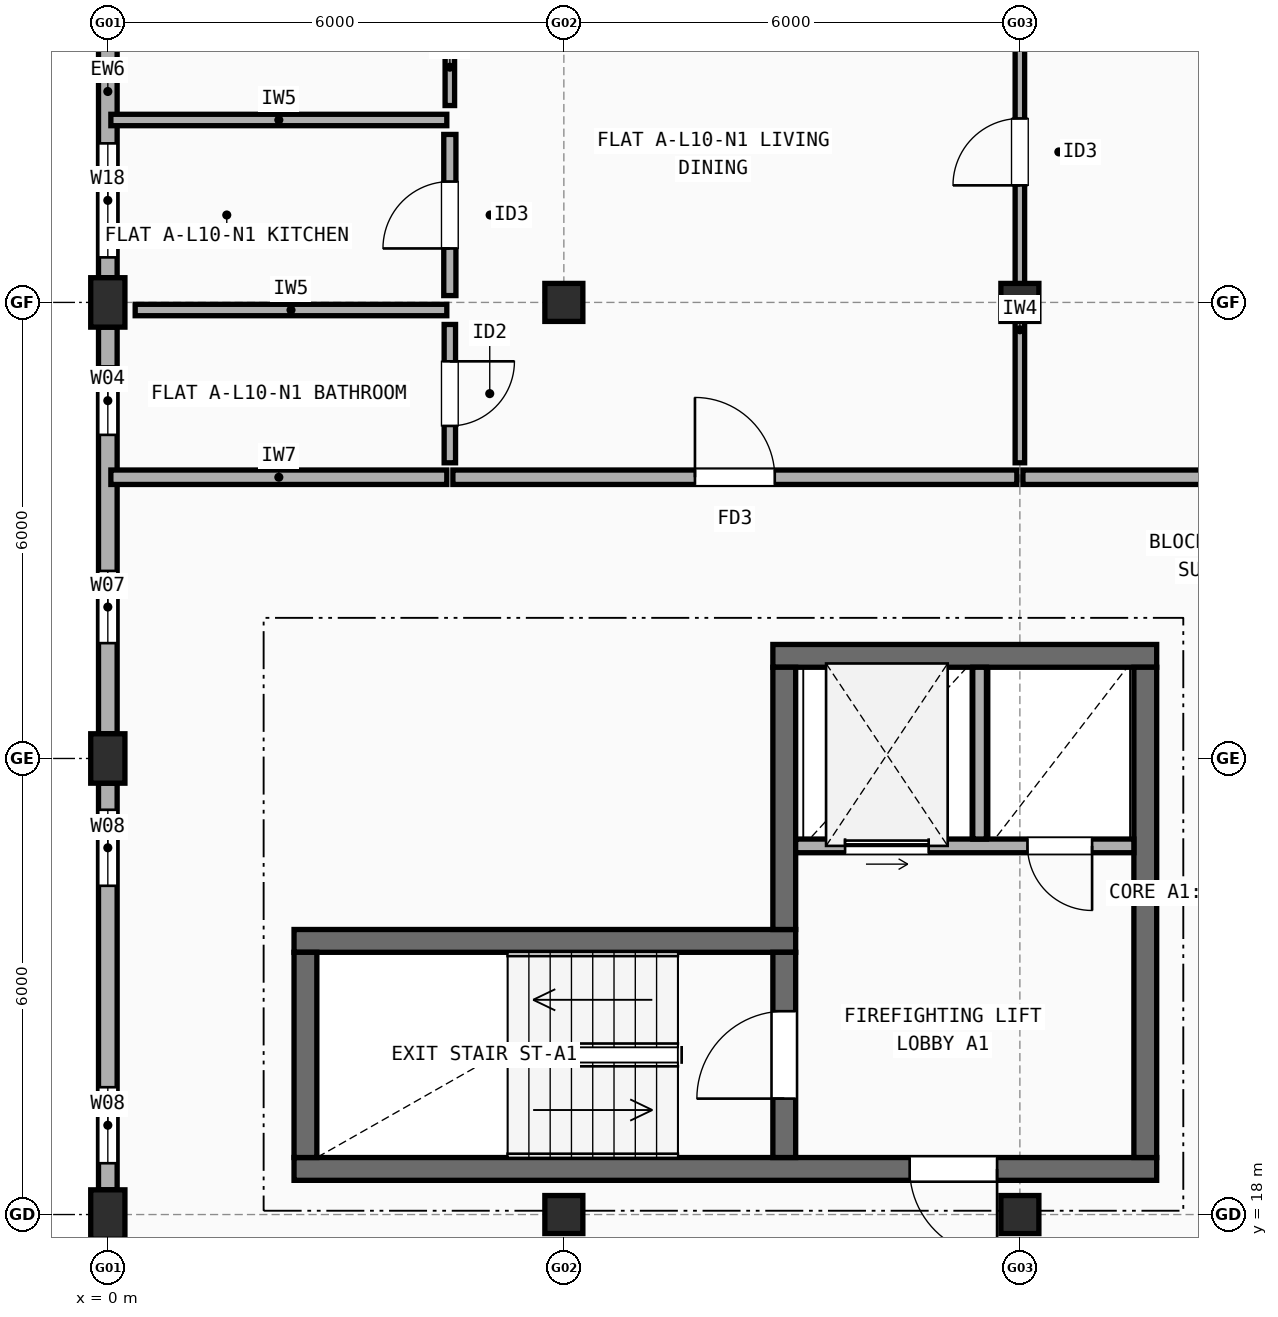
"""IFC4 building model, lengths in metres.
Left out: names, types, materials, properties, quantities, classifications, styles, units other than length and angle.
Written with IfcOpenShell. Run it as: python <this file> out.ifc"""

import sys

from ifc_helpers import new_model, si_unit, direction, frame, frame_2d, origin, origin_2d, place, context, subcontext, project, spatial, rectangle, extrude, element, fill, save


model = new_model("IFC4")
c1 = context("Model", 3, precision=1e-05, world=origin(), true_north=direction((0.0, 1.0)))
c2 = subcontext(c1, "Body", "Model", "MODEL_VIEW")
j1 = project(units=[si_unit("LENGTHUNIT", "METRE"), si_unit("PLANEANGLEUNIT", "RADIAN")], contexts=[c1])
p1 = place(None, origin())
s1 = spatial("IfcSite", under=j1, at=p1, CompositionType="ELEMENT")
p2 = place(p1, origin())
s2 = spatial("IfcBuilding", under=s1, at=p2, CompositionType="ELEMENT")
p3 = place(p2, frame((0.0, 0.0, 33.3)))
s3 = spatial("IfcBuildingStorey", under=s2, at=p3, CompositionType="ELEMENT", Elevation=33.3)
for number, where, z_axis, x_axis in (
    (1, (0.0, 18.0, 0.0), (0.0, 0.0, 1.0), (1.0, 0.0, 0.0)),
    (2, (0.0, 24.0, 0.0), (0.0, 0.0, 1.0), (1.0, 0.0, 0.0)),
    (3, (0.0, 30.0, 0.0), (0.0, 0.0, 1.0), (1.0, 0.0, 0.0)),
):
    element("IfcColumn", number, at=place(p3, frame(where, z_axis=z_axis, x_axis=x_axis)), inside=s3, PredefinedType="COLUMN", context=c2, shape_type="SweptSolid", body=[
        extrude(rectangle(XDim=0.45, YDim=0.65, at=origin_2d()), origin(), (0.0, 0.0, 1.0), 2.99),
    ])
for number, where, z_axis, x_axis in (
    (4, (6.0, 18.0, 0.0), (0.0, 0.0, 1.0), (1.0, 0.0, 0.0)),
    (5, (6.0, 30.0, 0.0), (0.0, 0.0, 1.0), (1.0, 0.0, 0.0)),
    (6, (12.0, 18.0, 0.0), (0.0, 0.0, 1.0), (1.0, 0.0, 0.0)),
    (7, (12.0, 30.0, 0.0), (0.0, 0.0, 1.0), (1.0, 0.0, 0.0)),
):
    element("IfcColumn", number, at=place(p3, frame(where, z_axis=z_axis, x_axis=x_axis)), inside=s3, PredefinedType="COLUMN", context=c2, shape_type="SweptSolid", body=[
        extrude(rectangle(XDim=0.5, YDim=0.5, at=origin_2d()), origin(), (0.0, 0.0, 1.0), 2.99),
    ])
p4 = place(p3, frame((0.0, 35.675, 0.0), z_axis=(0.0, 0.0, 1.0), x_axis=(0.0, -1.0, 0.0)))
e8 = element("IfcWall", 8, at=p4, inside=s3, PredefinedType="STANDARD", context=c2, shape_type="SweptSolid", body=[
    extrude(rectangle(XDim=5.35, YDim=0.245, at=frame_2d((2.675, 0.0))), origin(), (0.0, 0.0, 1.0), 2.472),
])
p5 = place(p4, frame((1.018, 0.0, 0.9)))
e9 = element("IfcOpeningElement", 9, at=p5, cuts=e8, PredefinedType="OPENING", context=c2, shape_type="SweptSolid", body=[
    extrude(rectangle(XDim=1.2, YDim=1.35, at=frame_2d((0.6, 0.675))), frame((0.0, 0.133, 0.0), z_axis=(0.0, -1.0, 0.0), x_axis=(1.0, 0.0, 0.0)), (0.0, 0.0, 1.0), 0.265),
])
p6 = place(p4, frame((3.583, 0.0, 0.9)))
e10 = element("IfcOpeningElement", 10, at=p6, cuts=e8, PredefinedType="OPENING", context=c2, shape_type="SweptSolid", body=[
    extrude(rectangle(XDim=1.5, YDim=1.4, at=frame_2d((0.75, 0.7))), frame((0.0, 0.133, 0.0), z_axis=(0.0, -1.0, 0.0), x_axis=(1.0, 0.0, 0.0)), (0.0, 0.0, 1.0), 0.265),
])
p7 = place(p3, frame((0.0, 29.675, 0.0), z_axis=(0.0, 0.0, 1.0), x_axis=(0.0, -1.0, 0.0)))
e11 = element("IfcWall", 11, at=p7, inside=s3, PredefinedType="STANDARD", context=c2, shape_type="SweptSolid", body=[
    extrude(rectangle(XDim=5.35, YDim=0.245, at=frame_2d((2.675, 0.0))), origin(), (0.0, 0.0, 1.0), 2.472),
])
p8 = place(p7, frame((0.518, 0.0, 0.9)))
e12 = element("IfcOpeningElement", 12, at=p8, cuts=e11, PredefinedType="OPENING", context=c2, shape_type="SweptSolid", body=[
    extrude(rectangle(XDim=0.9, YDim=1.3, at=frame_2d((0.45, 0.65))), frame((0.0, 0.133, 0.0), z_axis=(0.0, -1.0, 0.0), x_axis=(1.0, 0.0, 0.0)), (0.0, 0.0, 1.0), 0.265),
])
p9 = place(p7, frame((3.208, 0.0, 0.9)))
e13 = element("IfcOpeningElement", 13, at=p9, cuts=e11, PredefinedType="OPENING", context=c2, shape_type="SweptSolid", body=[
    extrude(rectangle(XDim=0.95, YDim=1.35, at=frame_2d((0.475, 0.675))), frame((0.0, 0.133, 0.0), z_axis=(0.0, -1.0, 0.0), x_axis=(1.0, 0.0, 0.0)), (0.0, 0.0, 1.0), 0.265),
])
p10 = place(p3, frame((0.0, 23.675, 0.0), z_axis=(0.0, 0.0, 1.0), x_axis=(0.0, -1.0, 0.0)))
e14 = element("IfcWall", 14, at=p10, inside=s3, PredefinedType="STANDARD", context=c2, shape_type="SweptSolid", body=[
    extrude(rectangle(XDim=5.35, YDim=0.245, at=frame_2d((2.675, 0.0))), origin(), (0.0, 0.0, 1.0), 2.472),
])
p11 = place(p10, frame((0.35, 0.0, 0.9)))
e15 = element("IfcOpeningElement", 15, at=p11, cuts=e14, PredefinedType="OPENING", context=c2, shape_type="SweptSolid", body=[
    extrude(rectangle(XDim=1.0, YDim=1.4, at=frame_2d((0.5, 0.7))), frame((0.0, 0.133, 0.0), z_axis=(0.0, -1.0, 0.0), x_axis=(1.0, 0.0, 0.0)), (0.0, 0.0, 1.0), 0.265),
])
p12 = place(p10, frame((4.0, 0.0, 0.9)))
e16 = element("IfcOpeningElement", 16, at=p12, cuts=e14, PredefinedType="OPENING", context=c2, shape_type="SweptSolid", body=[
    extrude(rectangle(XDim=1.0, YDim=1.4, at=frame_2d((0.5, 0.7))), frame((0.0, 0.133, 0.0), z_axis=(0.0, -1.0, 0.0), x_axis=(1.0, 0.0, 0.0)), (0.0, 0.0, 1.0), 0.265),
])
p13 = place(p3, frame((2.45, 18.6, 0.0), z_axis=(0.0, 0.0, 1.0), x_axis=(1.0, 0.0, 0.0)))
e17 = element("IfcWall", 17, at=p13, inside=s3, PredefinedType="SHEAR", context=c2, shape_type="SweptSolid", body=[
    extrude(rectangle(XDim=11.35, YDim=0.3, at=frame_2d((5.675, 0.0))), origin(), (0.0, 0.0, 1.0), 2.99),
])
p14 = place(p13, frame((8.1, 0.0, 0.0)))
e18 = element("IfcOpeningElement", 18, at=p14, cuts=e17, PredefinedType="OPENING", context=c2, shape_type="SweptSolid", body=[
    extrude(rectangle(XDim=1.15, YDim=2.15, at=frame_2d((0.575, 1.075))), frame((0.0, 0.16, 0.0), z_axis=(0.0, -1.0, 0.0), x_axis=(1.0, 0.0, 0.0)), (0.0, 0.0, 1.0), 0.32),
])
p15 = place(p3, frame((9.05, 21.6, 0.0), z_axis=(0.0, 0.0, 1.0), x_axis=(-1.0, 0.0, 0.0)))
e19 = element("IfcWall", 19, at=p15, inside=s3, PredefinedType="SHEAR", context=c2, shape_type="SweptSolid", body=[
    extrude(rectangle(XDim=6.6, YDim=0.3, at=frame_2d((3.3, 0.0))), origin(), (0.0, 0.0, 1.0), 2.99),
])
p16 = place(p3, frame((2.6, 21.45, 0.0), z_axis=(0.0, 0.0, 1.0), x_axis=(0.0, -1.0, 0.0)))
e20 = element("IfcWall", 20, at=p16, inside=s3, PredefinedType="SHEAR", context=c2, shape_type="SweptSolid", body=[
    extrude(rectangle(XDim=2.7, YDim=0.3, at=frame_2d((1.35, 0.0))), origin(), (0.0, 0.0, 1.0), 2.99),
])
p17 = place(p3, frame((8.9, 18.75, 0.0), z_axis=(0.0, 0.0, 1.0), x_axis=(0.0, 1.0, 0.0)))
e21 = element("IfcWall", 21, at=p17, inside=s3, PredefinedType="SHEAR", context=c2, shape_type="SweptSolid", body=[
    extrude(rectangle(XDim=2.7, YDim=0.3, at=frame_2d((1.35, 0.0))), origin(), (0.0, 0.0, 1.0), 2.99),
])
p18 = place(p17, frame((0.775, 0.0, 0.0)))
e22 = element("IfcOpeningElement", 22, at=p18, cuts=e21, PredefinedType="OPENING", context=c2, shape_type="SweptSolid", body=[
    extrude(rectangle(XDim=1.15, YDim=2.15, at=frame_2d((0.575, 1.075))), frame((0.0, 0.16, 0.0), z_axis=(0.0, -1.0, 0.0), x_axis=(1.0, 0.0, 0.0)), (0.0, 0.0, 1.0), 0.32),
])
p19 = place(p3, frame((13.8, 25.35, 0.0), z_axis=(0.0, 0.0, 1.0), x_axis=(-1.0, 0.0, 0.0)))
e23 = element("IfcWall", 23, at=p19, inside=s3, PredefinedType="SHEAR", context=c2, shape_type="SweptSolid", body=[
    extrude(rectangle(XDim=5.05, YDim=0.3, at=frame_2d((2.525, 0.0))), origin(), (0.0, 0.0, 1.0), 2.99),
])
p20 = place(p3, frame((13.65, 18.75, 0.0), z_axis=(0.0, 0.0, 1.0), x_axis=(0.0, 1.0, 0.0)))
e24 = element("IfcWall", 24, at=p20, inside=s3, PredefinedType="SHEAR", context=c2, shape_type="SweptSolid", body=[
    extrude(rectangle(XDim=6.45, YDim=0.3, at=frame_2d((3.225, 0.0))), origin(), (0.0, 0.0, 1.0), 2.99),
])
p21 = place(p3, frame((8.9, 21.75, 0.0), z_axis=(0.0, 0.0, 1.0), x_axis=(0.0, 1.0, 0.0)))
e25 = element("IfcWall", 25, at=p21, inside=s3, PredefinedType="SHEAR", context=c2, shape_type="SweptSolid", body=[
    extrude(rectangle(XDim=3.45, YDim=0.3, at=frame_2d((1.725, 0.0))), origin(), (0.0, 0.0, 1.0), 2.99),
])
p22 = place(p3, frame((9.05, 22.85, 0.0), z_axis=(0.0, 0.0, 1.0), x_axis=(1.0, 0.0, 0.0)))
e26 = element("IfcWall", 26, at=p22, inside=s3, PredefinedType="SOLIDWALL", context=c2, shape_type="SweptSolid", body=[
    extrude(rectangle(XDim=4.45, YDim=0.18, at=frame_2d((2.225, 0.0))), origin(), (0.0, 0.0, 1.0), 2.99),
])
p23 = place(p22, frame((0.65, 0.0, 0.0)))
e27 = element("IfcOpeningElement", 27, at=p23, cuts=e26, PredefinedType="OPENING", context=c2, shape_type="SweptSolid", body=[
    extrude(rectangle(XDim=1.1, YDim=2.15, at=frame_2d((0.55, 1.075))), frame((0.0, 0.1, 0.0), z_axis=(0.0, -1.0, 0.0), x_axis=(1.0, 0.0, 0.0)), (0.0, 0.0, 1.0), 0.2),
])
p24 = place(p22, frame((3.05, 0.0, 0.0)))
e28 = element("IfcOpeningElement", 28, at=p24, cuts=e26, PredefinedType="OPENING", context=c2, shape_type="SweptSolid", body=[
    extrude(rectangle(XDim=0.85, YDim=2.1, at=frame_2d((0.425, 1.05))), frame((0.0, 0.1, 0.0), z_axis=(0.0, -1.0, 0.0), x_axis=(1.0, 0.0, 0.0)), (0.0, 0.0, 1.0), 0.2),
])
p25 = place(p3, frame((11.47, 22.94, 0.0), z_axis=(0.0, 0.0, 1.0), x_axis=(0.0, 1.0, 0.0)))
e29 = element("IfcWall", 29, at=p25, inside=s3, PredefinedType="SOLIDWALL", context=c2, shape_type="SweptSolid", body=[
    extrude(rectangle(XDim=2.26, YDim=0.18, at=frame_2d((1.13, 0.0))), origin(), (0.0, 0.0, 1.0), 2.99),
])
p26 = place(p3, frame((0.04, 27.7, 0.0), z_axis=(0.0, 0.0, 1.0), x_axis=(1.0, 0.0, 0.0)))
e30 = element("IfcWall", 30, at=p26, inside=s3, PredefinedType="SOLIDWALL", context=c2, shape_type="SweptSolid", body=[
    extrude(rectangle(XDim=4.42, YDim=0.19, at=frame_2d((2.21, 0.0))), origin(), (0.0, 0.0, 1.0), 2.472),
])
p27 = place(p3, frame((4.54, 27.7, 0.0), z_axis=(0.0, 0.0, 1.0), x_axis=(1.0, 0.0, 0.0)))
e31 = element("IfcWall", 31, at=p27, inside=s3, PredefinedType="SOLIDWALL", context=c2, shape_type="SweptSolid", body=[
    extrude(rectangle(XDim=7.42, YDim=0.19, at=frame_2d((3.71, 0.0))), origin(), (0.0, 0.0, 1.0), 2.508),
])
p28 = place(p27, frame((3.185, 0.0, 0.0)))
e32 = element("IfcOpeningElement", 32, at=p28, cuts=e31, PredefinedType="OPENING", context=c2, shape_type="SweptSolid", body=[
    extrude(rectangle(XDim=1.05, YDim=2.15, at=frame_2d((0.525, 1.075))), frame((0.0, 0.105, 0.0), z_axis=(0.0, -1.0, 0.0), x_axis=(1.0, 0.0, 0.0)), (0.0, 0.0, 1.0), 0.21),
])
p29 = place(p3, frame((4.5, 32.59, 0.0), z_axis=(0.0, 0.0, 1.0), x_axis=(0.0, 1.0, 0.0)))
e33 = element("IfcWall", 33, at=p29, inside=s3, PredefinedType="PARTITIONING", context=c2, shape_type="SweptSolid", body=[
    extrude(rectangle(XDim=3.22, YDim=0.125, at=frame_2d((1.61, 0.0))), origin(), (0.0, 0.0, 1.0), 2.99),
])
p30 = place(p29, frame((1.16, 0.0, 0.0)))
e34 = element("IfcOpeningElement", 34, at=p30, cuts=e33, PredefinedType="OPENING", context=c2, shape_type="SweptSolid", body=[
    extrude(rectangle(XDim=0.9, YDim=2.1, at=frame_2d((0.45, 1.05))), frame((0.0, 0.073, 0.0), z_axis=(0.0, -1.0, 0.0), x_axis=(1.0, 0.0, 0.0)), (0.0, 0.0, 1.0), 0.145),
])
p31 = place(p3, frame((4.5, 30.09, 0.0), z_axis=(0.0, 0.0, 1.0), x_axis=(0.0, 1.0, 0.0)))
e35 = element("IfcWall", 35, at=p31, inside=s3, PredefinedType="PLUMBINGWALL", context=c2, shape_type="SweptSolid", body=[
    extrude(rectangle(XDim=2.12, YDim=0.16, at=frame_2d((1.06, 0.0))), origin(), (0.0, 0.0, 1.0), 2.472),
])
p32 = place(p31, frame((0.62, 0.0, 0.0)))
e36 = element("IfcOpeningElement", 36, at=p32, cuts=e35, PredefinedType="OPENING", context=c2, shape_type="SweptSolid", body=[
    extrude(rectangle(XDim=0.88, YDim=2.1, at=frame_2d((0.44, 1.05))), frame((0.0, 0.09, 0.0), z_axis=(0.0, -1.0, 0.0), x_axis=(1.0, 0.0, 0.0)), (0.0, 0.0, 1.0), 0.18),
])
p33 = place(p3, frame((4.5, 27.89, 0.0), z_axis=(0.0, 0.0, 1.0), x_axis=(0.0, 1.0, 0.0)))
e37 = element("IfcWall", 37, at=p33, inside=s3, PredefinedType="PARTITIONING", context=c2, shape_type="SweptSolid", body=[
    extrude(rectangle(XDim=1.82, YDim=0.15, at=frame_2d((0.91, 0.0))), origin(), (0.0, 0.0, 1.0), 2.99),
])
p34 = place(p33, frame((0.485, 0.0, 0.0)))
e38 = element("IfcOpeningElement", 38, at=p34, cuts=e37, PredefinedType="OPENING", context=c2, shape_type="SweptSolid", body=[
    extrude(rectangle(XDim=0.85, YDim=2.1, at=frame_2d((0.425, 1.05))), frame((0.0, 0.085, 0.0), z_axis=(0.0, -1.0, 0.0), x_axis=(1.0, 0.0, 0.0)), (0.0, 0.0, 1.0), 0.17),
])
p35 = place(p3, frame((0.04, 32.4, 0.0), z_axis=(0.0, 0.0, 1.0), x_axis=(1.0, 0.0, 0.0)))
e39 = element("IfcWall", 39, at=p35, inside=s3, PredefinedType="PARTITIONING", context=c2, shape_type="SweptSolid", body=[
    extrude(rectangle(XDim=4.42, YDim=0.15, at=frame_2d((2.21, 0.0))), origin(), (0.0, 0.0, 1.0), 2.472),
])
p36 = place(p3, frame((0.36, 29.9, 0.0), z_axis=(0.0, 0.0, 1.0), x_axis=(1.0, 0.0, 0.0)))
e40 = element("IfcWall", 40, at=p36, inside=s3, PredefinedType="PARTITIONING", context=c2, shape_type="SweptSolid", body=[
    extrude(rectangle(XDim=4.1, YDim=0.15, at=frame_2d((2.05, 0.0))), origin(), (0.0, 0.0, 1.0), 2.472),
])
p37 = place(p3, frame((12.04, 27.7, 0.0), z_axis=(0.0, 0.0, 1.0), x_axis=(1.0, 0.0, 0.0)))
e41 = element("IfcWall", 41, at=p37, inside=s3, PredefinedType="SOLIDWALL", context=c2, shape_type="SweptSolid", body=[
    extrude(rectangle(XDim=2.92, YDim=0.19, at=frame_2d((1.46, 0.0))), origin(), (0.0, 0.0, 1.0), 2.508),
])
p38 = place(p3, frame((12.0, 27.89, 0.0), z_axis=(0.0, 0.0, 1.0), x_axis=(0.0, 1.0, 0.0)))
e42 = element("IfcWall", 42, at=p38, inside=s3, PredefinedType="PARTITIONING", context=c2, shape_type="SweptSolid", body=[
    extrude(rectangle(XDim=7.6, YDim=0.125, at=frame_2d((3.8, 0.0))), origin(), (0.0, 0.0, 1.0), 2.458),
])
p39 = place(p38, frame((3.65, 0.0, 0.0)))
e43 = element("IfcOpeningElement", 43, at=p39, cuts=e42, PredefinedType="OPENING", context=c2, shape_type="SweptSolid", body=[
    extrude(rectangle(XDim=0.88, YDim=2.1, at=frame_2d((0.44, 1.05))), frame((0.0, 0.073, 0.0), z_axis=(0.0, -1.0, 0.0), x_axis=(1.0, 0.0, 0.0)), (0.0, 0.0, 1.0), 0.145),
])
p40 = place(p6, origin())
e44 = element("IfcWindow", 44, at=p40, inside=s3, PartitioningType="SINGLE_PANEL", PredefinedType="WINDOW", context=c2, shape_type="SweptSolid", body=[
    extrude(rectangle(XDim=1.5, YDim=1.4, at=frame_2d((0.75, 0.7))), frame((0.0, 0.03, 0.0), z_axis=(0.0, -1.0, 0.0), x_axis=(1.0, 0.0, 0.0)), (0.0, 0.0, 1.0), 0.06),
])
fill(e10, e44)
p41 = place(p8, origin())
e45 = element("IfcWindow", 45, at=p41, inside=s3, PartitioningType="SINGLE_PANEL", PredefinedType="WINDOW", context=c2, shape_type="SweptSolid", body=[
    extrude(rectangle(XDim=0.9, YDim=1.3, at=frame_2d((0.45, 0.65))), frame((0.0, 0.03, 0.0), z_axis=(0.0, -1.0, 0.0), x_axis=(1.0, 0.0, 0.0)), (0.0, 0.0, 1.0), 0.06),
])
fill(e12, e45)
p42 = place(p9, origin())
e46 = element("IfcWindow", 46, at=p42, inside=s3, PartitioningType="SINGLE_PANEL", PredefinedType="WINDOW", context=c2, shape_type="SweptSolid", body=[
    extrude(rectangle(XDim=0.95, YDim=1.35, at=frame_2d((0.475, 0.675))), frame((0.0, 0.03, 0.0), z_axis=(0.0, -1.0, 0.0), x_axis=(1.0, 0.0, 0.0)), (0.0, 0.0, 1.0), 0.06),
])
fill(e13, e46)
p43 = place(p11, origin())
e47 = element("IfcWindow", 47, at=p43, inside=s3, PartitioningType="SINGLE_PANEL", PredefinedType="WINDOW", context=c2, shape_type="SweptSolid", body=[
    extrude(rectangle(XDim=1.0, YDim=1.4, at=frame_2d((0.5, 0.7))), frame((0.0, 0.03, 0.0), z_axis=(0.0, -1.0, 0.0), x_axis=(1.0, 0.0, 0.0)), (0.0, 0.0, 1.0), 0.06),
])
fill(e15, e47)
p44 = place(p12, origin())
e48 = element("IfcWindow", 48, at=p44, inside=s3, PartitioningType="SINGLE_PANEL", PredefinedType="WINDOW", context=c2, shape_type="SweptSolid", body=[
    extrude(rectangle(XDim=1.0, YDim=1.4, at=frame_2d((0.5, 0.7))), frame((0.0, 0.03, 0.0), z_axis=(0.0, -1.0, 0.0), x_axis=(1.0, 0.0, 0.0)), (0.0, 0.0, 1.0), 0.06),
])
fill(e16, e48)
p45 = place(p14, origin())
e49 = element("IfcDoor", 49, at=p45, inside=s3, OperationType="SINGLE_SWING_RIGHT", PredefinedType="DOOR", context=c2, shape_type="SweptSolid", body=[
    extrude(rectangle(XDim=1.15, YDim=2.15, at=frame_2d((0.575, 1.075))), frame((0.0, 0.025, 0.0), z_axis=(0.0, -1.0, 0.0), x_axis=(1.0, 0.0, 0.0)), (0.0, 0.0, 1.0), 0.05),
])
fill(e18, e49)
p46 = place(p18, origin())
e50 = element("IfcDoor", 50, at=p46, inside=s3, OperationType="SINGLE_SWING_LEFT", PredefinedType="DOOR", context=c2, shape_type="SweptSolid", body=[
    extrude(rectangle(XDim=1.15, YDim=2.15, at=frame_2d((0.575, 1.075))), frame((0.0, 0.025, 0.0), z_axis=(0.0, -1.0, 0.0), x_axis=(1.0, 0.0, 0.0)), (0.0, 0.0, 1.0), 0.05),
])
fill(e22, e50)
p47 = place(p23, origin())
e51 = element("IfcDoor", 51, at=p47, inside=s3, OperationType="SLIDING_TO_LEFT", PredefinedType="DOOR", context=c2, shape_type="SweptSolid", body=[
    extrude(rectangle(XDim=1.1, YDim=2.15, at=frame_2d((0.55, 1.075))), frame((0.0, 0.025, 0.0), z_axis=(0.0, -1.0, 0.0), x_axis=(1.0, 0.0, 0.0)), (0.0, 0.0, 1.0), 0.05),
])
fill(e27, e51)
p48 = place(p24, frame((0.85, 0.0, 0.0), z_axis=(0.0, 0.0, 1.0), x_axis=(-1.0, 0.0, 0.0)))
e52 = element("IfcDoor", 52, at=p48, inside=s3, OperationType="SINGLE_SWING_RIGHT", PredefinedType="DOOR", context=c2, shape_type="SweptSolid", body=[
    extrude(rectangle(XDim=0.85, YDim=2.1, at=frame_2d((0.425, 1.05))), frame((0.0, 0.025, 0.0), z_axis=(0.0, -1.0, 0.0), x_axis=(1.0, 0.0, 0.0)), (0.0, 0.0, 1.0), 0.05),
])
fill(e28, e52)
p49 = place(p28, origin())
e53 = element("IfcDoor", 53, at=p49, inside=s3, OperationType="SINGLE_SWING_LEFT", PredefinedType="DOOR", context=c2, shape_type="SweptSolid", body=[
    extrude(rectangle(XDim=1.05, YDim=2.15, at=frame_2d((0.525, 1.075))), frame((0.0, 0.025, 0.0), z_axis=(0.0, -1.0, 0.0), x_axis=(1.0, 0.0, 0.0)), (0.0, 0.0, 1.0), 0.05),
])
fill(e32, e53)
p50 = place(p32, origin())
e54 = element("IfcDoor", 54, at=p50, inside=s3, OperationType="SINGLE_SWING_LEFT", PredefinedType="DOOR", context=c2, shape_type="SweptSolid", body=[
    extrude(rectangle(XDim=0.88, YDim=2.1, at=frame_2d((0.44, 1.05))), frame((0.0, 0.025, 0.0), z_axis=(0.0, -1.0, 0.0), x_axis=(1.0, 0.0, 0.0)), (0.0, 0.0, 1.0), 0.05),
])
fill(e36, e54)
p51 = place(p34, origin())
e55 = element("IfcDoor", 55, at=p51, inside=s3, OperationType="SINGLE_SWING_RIGHT", PredefinedType="DOOR", context=c2, shape_type="SweptSolid", body=[
    extrude(rectangle(XDim=0.85, YDim=2.1, at=frame_2d((0.425, 1.05))), frame((0.0, 0.025, 0.0), z_axis=(0.0, -1.0, 0.0), x_axis=(1.0, 0.0, 0.0)), (0.0, 0.0, 1.0), 0.05),
])
fill(e38, e55)
p52 = place(p39, origin())
e56 = element("IfcDoor", 56, at=p52, inside=s3, OperationType="SINGLE_SWING_LEFT", PredefinedType="DOOR", context=c2, shape_type="SweptSolid", body=[
    extrude(rectangle(XDim=0.88, YDim=2.1, at=frame_2d((0.44, 1.05))), frame((0.0, 0.025, 0.0), z_axis=(0.0, -1.0, 0.0), x_axis=(1.0, 0.0, 0.0)), (0.0, 0.0, 1.0), 0.05),
])
fill(e43, e56)
save(model, sys.argv[1])
